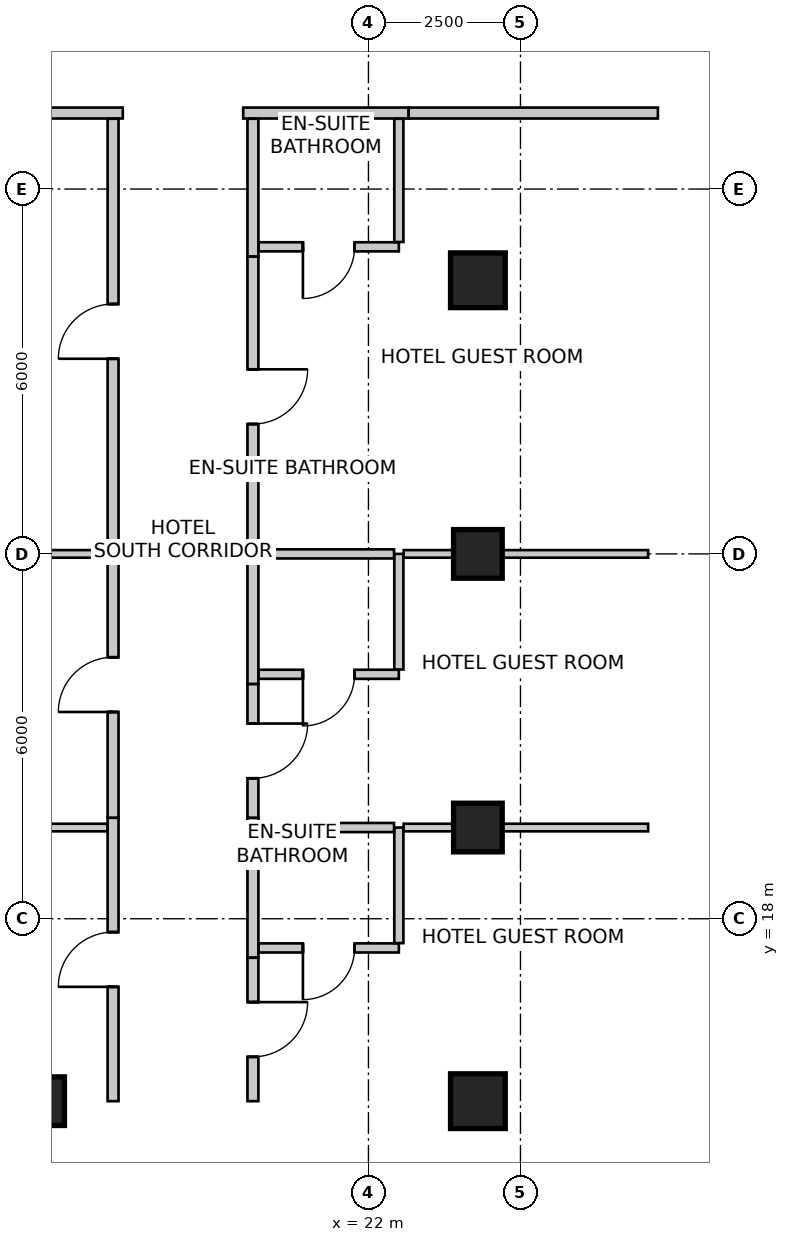
"""IFC4 building model, lengths in metres.
Left out: names, types, materials, properties, quantities, classifications, styles, units other than length and angle.
Written with IfcOpenShell. Run it as: python <this file> out.ifc"""

import sys

from ifc_helpers import new_model, si_unit, direction, frame, frame_2d, origin, origin_2d, place, context, subcontext, project, spatial, rectangle, extrude, source, transform, mapped, element, fill, save


model = new_model("IFC4")
c1 = context("Model", 3, precision=1e-05, world=origin(), true_north=direction((0.0, 1.0)))
c2 = subcontext(c1, "Body", "Model", "MODEL_VIEW")
j1 = project(units=[si_unit("LENGTHUNIT", "METRE"), si_unit("PLANEANGLEUNIT", "RADIAN")], contexts=[c1])
p1 = place(None, origin())
s1 = spatial("IfcSite", under=j1, at=p1, CompositionType="ELEMENT")
p2 = place(p1, origin())
s2 = spatial("IfcBuilding", under=s1, at=p2, CompositionType="ELEMENT")
p3 = place(p2, frame((0.0, 0.0, 121.4)))
s3 = spatial("IfcBuildingStorey", under=s2, at=p3, CompositionType="ELEMENT", Elevation=121.4)
m1 = source(origin(), c2, "Body", "SweptSolid", [
    extrude(rectangle(XDim=0.9, YDim=0.9, at=origin_2d()), origin(), (0.0, 0.0, 1.0), 3.6),
])
p4 = place(p3, frame((23.8, 28.5, 0.0), z_axis=(0.0, 0.0, 1.0), x_axis=(1.0, 0.0, 0.0)))
e1 = element("IfcColumn", 1, at=p4, inside=s3, PredefinedType="COLUMN", context=c2, shape_type="MappedRepresentation", body=[
    mapped(m1, transform((0.0, 0.0, 0.0), scale=1.0)),
])
m2 = source(origin(), c2, "Body", "SweptSolid", [
    extrude(rectangle(XDim=0.8, YDim=0.8, at=origin_2d()), origin(), (0.0, 0.0, 1.0), 3.6),
])
for number, where, z_axis, x_axis in (
    (2, (23.8, 24.0, 0.0), (0.0, 0.0, 1.0), (1.0, 0.0, 0.0)),
    (3, (23.8, 19.5, 0.0), (0.0, 0.0, 1.0), (1.0, 0.0, 0.0)),
):
    element("IfcColumn", number, at=place(p3, frame(where, z_axis=z_axis, x_axis=x_axis)), inside=s3, PredefinedType="COLUMN", context=c2, shape_type="MappedRepresentation", body=[
        mapped(m2, transform((0.0, 0.0, 0.0), scale=1.0)),
    ])
p5 = place(p3, frame((23.8, 15.0, 0.0), z_axis=(0.0, 0.0, 1.0), x_axis=(1.0, 0.0, 0.0)))
e4 = element("IfcColumn", 4, at=p5, inside=s3, PredefinedType="COLUMN", context=c2, shape_type="MappedRepresentation", body=[
    mapped(m1, transform((0.0, 0.0, 0.0), scale=1.0)),
])
p6 = place(p3, frame((16.6, 15.0, 0.0), z_axis=(0.0, 0.0, 1.0), x_axis=(1.0, 0.0, 0.0)))
e5 = element("IfcColumn", 5, at=p6, inside=s3, PredefinedType="COLUMN", context=c2, shape_type="MappedRepresentation", body=[
    mapped(m2, transform((0.0, 0.0, 0.0), scale=1.0)),
])
p7 = place(p3, frame((17.96, 31.25, 0.0), z_axis=(0.0, 0.0, 1.0), x_axis=(-1.0, 0.0, 0.0)))
e6 = element("IfcWall", 6, at=p7, inside=s3, PredefinedType="PARTITIONING", context=c2, shape_type="SweptSolid", body=[
    extrude(rectangle(XDim=5.366, YDim=0.18, at=frame_2d((2.683, 0.0))), origin(), (0.0, 0.0, 1.0), 3.034),
])
p8 = place(p3, frame((22.66, 31.25, 0.0), z_axis=(0.0, 0.0, 1.0), x_axis=(-1.0, 0.0, 0.0)))
e7 = element("IfcWall", 7, at=p8, inside=s3, PredefinedType="PARTITIONING", context=c2, shape_type="SweptSolid", body=[
    extrude(rectangle(XDim=2.72, YDim=0.18, at=frame_2d((1.36, 0.0))), origin(), (0.0, 0.0, 1.0), 3.034),
])
p9 = place(p3, frame((26.76, 31.25, 0.0), z_axis=(0.0, 0.0, 1.0), x_axis=(-1.0, 0.0, 0.0)))
e8 = element("IfcWall", 8, at=p9, inside=s3, PredefinedType="PARTITIONING", context=c2, shape_type="SweptSolid", body=[
    extrude(rectangle(XDim=4.098, YDim=0.18, at=frame_2d((2.049, 0.0))), origin(), (0.0, 0.0, 1.0), 3.35),
])
p10 = place(p3, frame((17.8, 15.0, 0.0), z_axis=(0.0, 0.0, 1.0), x_axis=(0.0, 1.0, 0.0)))
e9 = element("IfcWall", 9, at=p10, inside=s3, PredefinedType="PARTITIONING", context=c2, shape_type="SweptSolid", body=[
    extrude(rectangle(XDim=4.66, YDim=0.18, at=frame_2d((2.33, 0.0))), origin(), (0.0, 0.0, 1.0), 2.492),
])
m3 = source(origin(), c2, "Body", "SweptSolid", [
    extrude(rectangle(XDim=0.9, YDim=2.15, at=frame_2d((0.45, 1.075))), frame((0.0, 0.1, 0.0), z_axis=(0.0, -1.0, 0.0), x_axis=(1.0, 0.0, 0.0)), (0.0, 0.0, 1.0), 0.2),
])
p11 = place(p10, frame((1.88, 0.0, 0.0)))
e10 = element("IfcOpeningElement", 10, at=p11, cuts=e9, PredefinedType="OPENING", context=c2, shape_type="MappedRepresentation", body=[
    mapped(m3, transform((0.0, 0.0, 0.0), scale=1.0)),
])
p12 = place(p3, frame((20.1, 19.66, 0.0), z_axis=(0.0, 0.0, 1.0), x_axis=(0.0, -1.0, 0.0)))
e11 = element("IfcWall", 11, at=p12, inside=s3, PredefinedType="PARTITIONING", context=c2, shape_type="SweptSolid", body=[
    extrude(rectangle(XDim=2.3, YDim=0.18, at=frame_2d((1.15, 0.0))), origin(), (0.0, 0.0, 1.0), 3.35),
])
p13 = place(p3, frame((20.1, 17.358, 0.0), z_axis=(0.0, 0.0, 1.0), x_axis=(0.0, -1.0, 0.0)))
e12 = element("IfcWall", 12, at=p13, inside=s3, PredefinedType="PARTITIONING", context=c2, shape_type="SweptSolid", body=[
    extrude(rectangle(XDim=2.358, YDim=0.18, at=frame_2d((1.179, 0.0))), origin(), (0.0, 0.0, 1.0), 2.492),
])
p14 = place(p13, frame((0.729, 0.0, 0.0)))
e13 = element("IfcOpeningElement", 13, at=p14, cuts=e12, PredefinedType="OPENING", context=c2, shape_type="MappedRepresentation", body=[
    mapped(m3, transform((0.0, 0.0, 0.0), scale=1.0)),
])
p15 = place(p3, frame((17.8, 19.662, 0.0), z_axis=(0.0, 0.0, 1.0), x_axis=(0.0, 1.0, 0.0)))
e14 = element("IfcWall", 14, at=p15, inside=s3, PredefinedType="PARTITIONING", context=c2, shape_type="SweptSolid", body=[
    extrude(rectangle(XDim=4.498, YDim=0.18, at=frame_2d((2.249, 0.0))), origin(), (0.0, 0.0, 1.0), 2.803),
])
p16 = place(p15, frame((1.738, 0.0, 0.0)))
e15 = element("IfcOpeningElement", 15, at=p16, cuts=e14, PredefinedType="OPENING", context=c2, shape_type="MappedRepresentation", body=[
    mapped(m3, transform((0.0, 0.0, 0.0), scale=1.0)),
])
p17 = place(p3, frame((20.1, 24.16, 0.0), z_axis=(0.0, 0.0, 1.0), x_axis=(0.0, -1.0, 0.0)))
e16 = element("IfcWall", 16, at=p17, inside=s3, PredefinedType="PARTITIONING", context=c2, shape_type="SweptSolid", body=[
    extrude(rectangle(XDim=2.3, YDim=0.18, at=frame_2d((1.15, 0.0))), origin(), (0.0, 0.0, 1.0), 2.803),
])
p18 = place(p3, frame((20.1, 21.858, 0.0), z_axis=(0.0, 0.0, 1.0), x_axis=(0.0, -1.0, 0.0)))
e17 = element("IfcWall", 17, at=p18, inside=s3, PredefinedType="PARTITIONING", context=c2, shape_type="SweptSolid", body=[
    extrude(rectangle(XDim=2.196, YDim=0.18, at=frame_2d((1.098, 0.0))), origin(), (0.0, 0.0, 1.0), 2.922),
])
p19 = place(p18, frame((0.648, 0.0, 0.0)))
e18 = element("IfcOpeningElement", 18, at=p19, cuts=e17, PredefinedType="OPENING", context=c2, shape_type="MappedRepresentation", body=[
    mapped(m3, transform((0.0, 0.0, 0.0), scale=1.0)),
])
p20 = place(p3, frame((17.8, 24.162, 0.0), z_axis=(0.0, 0.0, 1.0), x_axis=(0.0, 1.0, 0.0)))
e19 = element("IfcWall", 19, at=p20, inside=s3, PredefinedType="PARTITIONING", context=c2, shape_type="SweptSolid", body=[
    extrude(rectangle(XDim=6.994, YDim=0.18, at=frame_2d((3.497, 0.0))), origin(), (0.0, 0.0, 1.0), 2.803),
])
p21 = place(p20, frame((3.047, 0.0, 0.0)))
e20 = element("IfcOpeningElement", 20, at=p21, cuts=e19, PredefinedType="OPENING", context=c2, shape_type="MappedRepresentation", body=[
    mapped(m3, transform((0.0, 0.0, 0.0), scale=1.0)),
])
p22 = place(p3, frame((20.1, 31.156, 0.0), z_axis=(0.0, 0.0, 1.0), x_axis=(0.0, -1.0, 0.0)))
e21 = element("IfcWall", 21, at=p22, inside=s3, PredefinedType="PARTITIONING", context=c2, shape_type="SweptSolid", body=[
    extrude(rectangle(XDim=2.266, YDim=0.18, at=frame_2d((1.133, 0.0))), origin(), (0.0, 0.0, 1.0), 3.034),
])
p23 = place(p3, frame((20.1, 28.888, 0.0), z_axis=(0.0, 0.0, 1.0), x_axis=(0.0, -1.0, 0.0)))
e22 = element("IfcWall", 22, at=p23, inside=s3, PredefinedType="PARTITIONING", context=c2, shape_type="SweptSolid", body=[
    extrude(rectangle(XDim=4.726, YDim=0.18, at=frame_2d((2.363, 0.0))), origin(), (0.0, 0.0, 1.0), 2.803),
])
p24 = place(p23, frame((1.853, 0.0, 0.0)))
e23 = element("IfcOpeningElement", 23, at=p24, cuts=e22, PredefinedType="OPENING", context=c2, shape_type="MappedRepresentation", body=[
    mapped(m3, transform((0.0, 0.0, 0.0), scale=1.0)),
])
p25 = place(p3, frame((13.164, 19.5, 0.0), z_axis=(0.0, 0.0, 1.0), x_axis=(1.0, 0.0, 0.0)))
e24 = element("IfcWall", 24, at=p25, inside=s3, PredefinedType="PARTITIONING", context=c2, shape_type="SweptSolid", body=[
    extrude(rectangle(XDim=4.542, YDim=0.125, at=frame_2d((2.271, 0.0))), origin(), (0.0, 0.0, 1.0), 3.35),
])
p26 = place(p3, frame((22.5, 17.52, 0.0), z_axis=(0.0, 0.0, 1.0), x_axis=(-1.0, 0.0, 0.0)))
e25 = element("IfcWall", 25, at=p26, inside=s3, PredefinedType="PARTITIONING", context=c2, shape_type="SweptSolid", body=[
    extrude(rectangle(XDim=2.306, YDim=0.15, at=frame_2d((1.153, 0.0))), origin(), (0.0, 0.0, 1.0), 2.922),
])
m4 = source(origin(), c2, "Body", "SweptSolid", [
    extrude(rectangle(XDim=0.85, YDim=2.15, at=frame_2d((0.425, 1.075))), frame((0.0, 0.085, 0.0), z_axis=(0.0, -1.0, 0.0), x_axis=(1.0, 0.0, 0.0)), (0.0, 0.0, 1.0), 0.17),
])
p27 = place(p26, frame((0.728, 0.0, 0.0)))
e26 = element("IfcOpeningElement", 26, at=p27, cuts=e25, PredefinedType="OPENING", context=c2, shape_type="MappedRepresentation", body=[
    mapped(m4, transform((0.0, 0.0, 0.0), scale=1.0)),
])
p28 = place(p3, frame((22.5, 19.5, 0.0), z_axis=(0.0, 0.0, 1.0), x_axis=(0.0, -1.0, 0.0)))
e27 = element("IfcWall", 27, at=p28, inside=s3, PredefinedType="PARTITIONING", context=c2, shape_type="SweptSolid", body=[
    extrude(rectangle(XDim=1.901, YDim=0.15, at=frame_2d((0.95, 0.0))), origin(), (0.0, 0.0, 1.0), 2.922),
])
p29 = place(p3, frame((20.194, 19.5, 0.0), z_axis=(0.0, 0.0, 1.0), x_axis=(1.0, 0.0, 0.0)))
e28 = element("IfcWall", 28, at=p29, inside=s3, PredefinedType="PARTITIONING", context=c2, shape_type="SweptSolid", body=[
    extrude(rectangle(XDim=2.227, YDim=0.15, at=frame_2d((1.113, 0.0))), origin(), (0.0, 0.0, 1.0), 3.35),
])
p30 = place(p3, frame((22.579, 19.5, 0.0), z_axis=(0.0, 0.0, 1.0), x_axis=(1.0, 0.0, 0.0)))
e29 = element("IfcWall", 29, at=p30, inside=s3, PredefinedType="PARTITIONING", context=c2, shape_type="SweptSolid", body=[
    extrude(rectangle(XDim=4.021, YDim=0.125, at=frame_2d((2.01, 0.0))), origin(), (0.0, 0.0, 1.0), 2.492),
])
p31 = place(p3, frame((12.295, 24.0, 0.0), z_axis=(0.0, 0.0, 1.0), x_axis=(1.0, 0.0, 0.0)))
e30 = element("IfcWall", 30, at=p31, inside=s3, PredefinedType="PARTITIONING", context=c2, shape_type="SweptSolid", body=[
    extrude(rectangle(XDim=5.411, YDim=0.125, at=frame_2d((2.706, 0.0))), origin(), (0.0, 0.0, 1.0), 2.803),
])
p32 = place(p3, frame((22.5, 22.02, 0.0), z_axis=(0.0, 0.0, 1.0), x_axis=(-1.0, 0.0, 0.0)))
e31 = element("IfcWall", 31, at=p32, inside=s3, PredefinedType="PARTITIONING", context=c2, shape_type="SweptSolid", body=[
    extrude(rectangle(XDim=2.306, YDim=0.15, at=frame_2d((1.153, 0.0))), origin(), (0.0, 0.0, 1.0), 3.35),
])
p33 = place(p32, frame((0.728, 0.0, 0.0)))
e32 = element("IfcOpeningElement", 32, at=p33, cuts=e31, PredefinedType="OPENING", context=c2, shape_type="MappedRepresentation", body=[
    mapped(m4, transform((0.0, 0.0, 0.0), scale=1.0)),
])
p34 = place(p3, frame((22.5, 24.0, 0.0), z_axis=(0.0, 0.0, 1.0), x_axis=(0.0, -1.0, 0.0)))
e33 = element("IfcWall", 33, at=p34, inside=s3, PredefinedType="PARTITIONING", context=c2, shape_type="SweptSolid", body=[
    extrude(rectangle(XDim=1.901, YDim=0.15, at=frame_2d((0.95, 0.0))), origin(), (0.0, 0.0, 1.0), 2.803),
])
p35 = place(p3, frame((20.194, 24.0, 0.0), z_axis=(0.0, 0.0, 1.0), x_axis=(1.0, 0.0, 0.0)))
e34 = element("IfcWall", 34, at=p35, inside=s3, PredefinedType="PARTITIONING", context=c2, shape_type="SweptSolid", body=[
    extrude(rectangle(XDim=2.227, YDim=0.15, at=frame_2d((1.113, 0.0))), origin(), (0.0, 0.0, 1.0), 2.803),
])
p36 = place(p3, frame((22.579, 24.0, 0.0), z_axis=(0.0, 0.0, 1.0), x_axis=(1.0, 0.0, 0.0)))
e35 = element("IfcWall", 35, at=p36, inside=s3, PredefinedType="PARTITIONING", context=c2, shape_type="SweptSolid", body=[
    extrude(rectangle(XDim=4.021, YDim=0.125, at=frame_2d((2.01, 0.0))), origin(), (0.0, 0.0, 1.0), 2.492),
])
p37 = place(p3, frame((22.5, 29.05, 0.0), z_axis=(0.0, 0.0, 1.0), x_axis=(-1.0, 0.0, 0.0)))
e36 = element("IfcWall", 36, at=p37, inside=s3, PredefinedType="PARTITIONING", context=c2, shape_type="SweptSolid", body=[
    extrude(rectangle(XDim=2.306, YDim=0.15, at=frame_2d((1.153, 0.0))), origin(), (0.0, 0.0, 1.0), 3.034),
])
p38 = place(p37, frame((0.728, 0.0, 0.0)))
e37 = element("IfcOpeningElement", 37, at=p38, cuts=e36, PredefinedType="OPENING", context=c2, shape_type="MappedRepresentation", body=[
    mapped(m4, transform((0.0, 0.0, 0.0), scale=1.0)),
])
p39 = place(p3, frame((22.5, 31.156, 0.0), z_axis=(0.0, 0.0, 1.0), x_axis=(0.0, -1.0, 0.0)))
e38 = element("IfcWall", 38, at=p39, inside=s3, PredefinedType="PARTITIONING", context=c2, shape_type="SweptSolid", body=[
    extrude(rectangle(XDim=2.027, YDim=0.15, at=frame_2d((1.014, 0.0))), origin(), (0.0, 0.0, 1.0), 3.034),
])
m5 = source(origin(), c2, "Body", "SweptSolid", [
    extrude(rectangle(XDim=0.9, YDim=2.15, at=frame_2d((0.45, 1.075))), frame((0.0, 0.025, 0.0), z_axis=(0.0, -1.0, 0.0), x_axis=(1.0, 0.0, 0.0)), (0.0, 0.0, 1.0), 0.05),
])
p40 = place(p11, origin())
e39 = element("IfcDoor", 39, at=p40, inside=s3, OperationType="SINGLE_SWING_LEFT", PredefinedType="DOOR", context=c2, shape_type="MappedRepresentation", body=[
    mapped(m5, transform((0.0, 0.0, 0.0), scale=1.0)),
])
fill(e10, e39)
m6 = source(origin(), c2, "Body", "SweptSolid", [
    extrude(rectangle(XDim=0.85, YDim=2.15, at=frame_2d((0.425, 1.075))), frame((0.0, 0.025, 0.0), z_axis=(0.0, -1.0, 0.0), x_axis=(1.0, 0.0, 0.0)), (0.0, 0.0, 1.0), 0.05),
])
p41 = place(p27, origin())
e40 = element("IfcDoor", 40, at=p41, inside=s3, OperationType="SINGLE_SWING_RIGHT", PredefinedType="DOOR", context=c2, shape_type="MappedRepresentation", body=[
    mapped(m6, transform((0.0, 0.0, 0.0), scale=1.0)),
])
fill(e26, e40)
p42 = place(p14, origin())
e41 = element("IfcDoor", 41, at=p42, inside=s3, OperationType="SINGLE_SWING_LEFT", PredefinedType="DOOR", context=c2, shape_type="MappedRepresentation", body=[
    mapped(m5, transform((0.0, 0.0, 0.0), scale=1.0)),
])
fill(e13, e41)
p43 = place(p16, origin())
e42 = element("IfcDoor", 42, at=p43, inside=s3, OperationType="SINGLE_SWING_LEFT", PredefinedType="DOOR", context=c2, shape_type="MappedRepresentation", body=[
    mapped(m5, transform((0.0, 0.0, 0.0), scale=1.0)),
])
fill(e15, e42)
p44 = place(p33, origin())
e43 = element("IfcDoor", 43, at=p44, inside=s3, OperationType="SINGLE_SWING_RIGHT", PredefinedType="DOOR", context=c2, shape_type="MappedRepresentation", body=[
    mapped(m6, transform((0.0, 0.0, 0.0), scale=1.0)),
])
fill(e32, e43)
p45 = place(p19, origin())
e44 = element("IfcDoor", 44, at=p45, inside=s3, OperationType="SINGLE_SWING_LEFT", PredefinedType="DOOR", context=c2, shape_type="MappedRepresentation", body=[
    mapped(m5, transform((0.0, 0.0, 0.0), scale=1.0)),
])
fill(e18, e44)
p46 = place(p21, origin())
e45 = element("IfcDoor", 45, at=p46, inside=s3, OperationType="SINGLE_SWING_LEFT", PredefinedType="DOOR", context=c2, shape_type="MappedRepresentation", body=[
    mapped(m5, transform((0.0, 0.0, 0.0), scale=1.0)),
])
fill(e20, e45)
p47 = place(p38, origin())
e46 = element("IfcDoor", 46, at=p47, inside=s3, OperationType="SINGLE_SWING_RIGHT", PredefinedType="DOOR", context=c2, shape_type="MappedRepresentation", body=[
    mapped(m6, transform((0.0, 0.0, 0.0), scale=1.0)),
])
fill(e37, e46)
p48 = place(p24, origin())
e47 = element("IfcDoor", 47, at=p48, inside=s3, OperationType="SINGLE_SWING_LEFT", PredefinedType="DOOR", context=c2, shape_type="MappedRepresentation", body=[
    mapped(m5, transform((0.0, 0.0, 0.0), scale=1.0)),
])
fill(e23, e47)
save(model, sys.argv[1])
